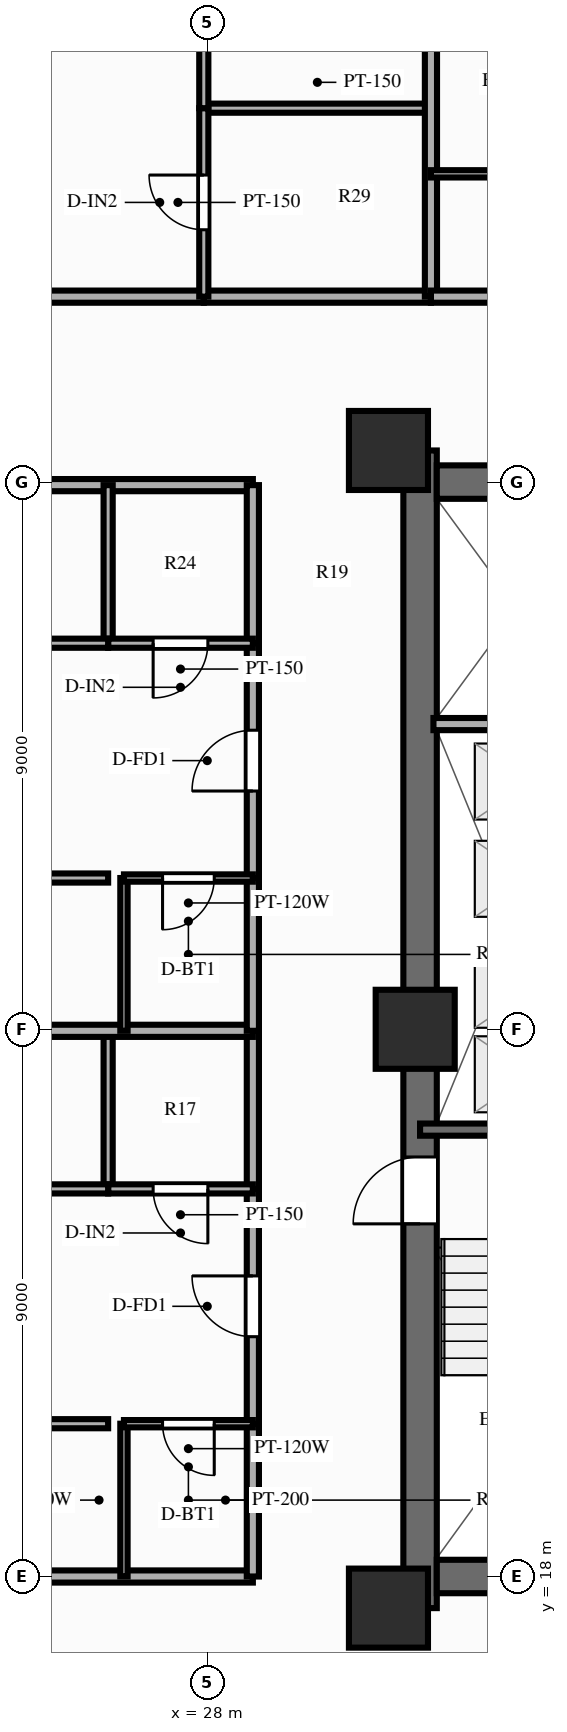
"""IFC4 building model, lengths in metres.
Left out: names, types, materials, properties, quantities, classifications, styles, units other than length and angle.
Written with IfcOpenShell. Run it as: python <this file> out.ifc"""

import sys

from ifc_helpers import new_model, si_unit, direction, frame, frame_2d, origin, origin_2d, place, context, subcontext, project, spatial, rectangle, extrude, source, transform, mapped, element, fill, save


model = new_model("IFC4")
c1 = context("Model", 3, precision=1e-05, world=origin(), true_north=direction((0.0, 1.0)))
c2 = subcontext(c1, "Body", "Model", "MODEL_VIEW")
j1 = project(units=[si_unit("LENGTHUNIT", "METRE"), si_unit("PLANEANGLEUNIT", "RADIAN")], contexts=[c1])
p1 = place(None, origin())
s1 = spatial("IfcSite", under=j1, at=p1, CompositionType="ELEMENT")
p2 = place(p1, origin())
s2 = spatial("IfcBuilding", under=s1, at=p2, CompositionType="ELEMENT")
p3 = place(p2, frame((0.0, 0.0, 83.85)))
s3 = spatial("IfcBuildingStorey", under=s2, at=p3, CompositionType="ELEMENT", Elevation=83.85)
p4 = place(p3, frame((31.5, 17.48, 0.0), z_axis=(0.0, 0.0, 1.0), x_axis=(0.0, 1.0, 0.0)))
e1 = element("IfcWall", 1, at=p4, inside=s3, PredefinedType="SHEAR", context=c2, shape_type="SweptSolid", body=[
    extrude(rectangle(XDim=19.04, YDim=0.55, at=frame_2d((9.52, 0.0))), origin(), (0.0, 0.0, 1.0), 3.0),
])
p5 = place(p4, frame((6.32, 0.0, 0.0)))
e2 = element("IfcOpeningElement", 2, at=p5, cuts=e1, PredefinedType="OPENING", context=c2, shape_type="SweptSolid", body=[
    extrude(rectangle(XDim=1.1, YDim=2.15, at=frame_2d((0.55, 1.075))), frame((0.0, 0.287, 0.0), z_axis=(0.0, -1.0, 0.0), x_axis=(1.0, 0.0, 0.0)), (0.0, 0.0, 1.0), 0.574),
])
p6 = place(p3, frame((31.775, 18.0, 0.0), z_axis=(0.0, 0.0, 1.0), x_axis=(1.0, 0.0, 0.0)))
e3 = element("IfcWall", 3, at=p6, inside=s3, PredefinedType="SHEAR", context=c2, shape_type="SweptSolid", body=[
    extrude(rectangle(XDim=12.45, YDim=0.55, at=frame_2d((6.225, 0.0))), origin(), (0.0, 0.0, 1.0), 3.0),
])
p7 = place(p3, frame((31.775, 36.0, 0.0), z_axis=(0.0, 0.0, 1.0), x_axis=(1.0, 0.0, 0.0)))
e4 = element("IfcWall", 4, at=p7, inside=s3, PredefinedType="SHEAR", context=c2, shape_type="SweptSolid", body=[
    extrude(rectangle(XDim=12.45, YDim=0.55, at=frame_2d((6.225, 0.0))), origin(), (0.0, 0.0, 1.0), 3.0),
])
p8 = place(p7, frame((5.175, 0.0, 0.0), z_axis=(0.0, 0.0, 1.0), x_axis=(-1.0, 0.0, 0.0)))
e5 = element("IfcOpeningElement", 5, at=p8, cuts=e4, PredefinedType="OPENING", context=c2, shape_type="SweptSolid", body=[
    extrude(rectangle(XDim=1.4, YDim=2.15, at=frame_2d((0.7, 1.075))), frame((0.0, 0.287, 0.0), z_axis=(0.0, -1.0, 0.0), x_axis=(1.0, 0.0, 0.0)), (0.0, 0.0, 1.0), 0.574),
])
m1 = source(origin(), c2, "Body", "SweptSolid", [
    extrude(rectangle(XDim=1.3, YDim=1.3, at=origin_2d()), origin(), (0.0, 0.0, 1.0), 3.0),
])
for number, where, z_axis, x_axis in (
    (6, (30.98, 17.48, 0.0), (0.0, 0.0, 1.0), (1.0, 0.0, 0.0)),
    (7, (30.98, 36.52, 0.0), (0.0, 0.0, 1.0), (1.0, 0.0, 0.0)),
    (8, (31.42, 27.0, 0.0), (0.0, 0.0, 1.0), (1.0, 0.0, 0.0)),
):
    element("IfcColumn", number, at=place(p3, frame(where, z_axis=z_axis, x_axis=x_axis)), inside=s3, PredefinedType="COLUMN", context=c2, shape_type="MappedRepresentation", body=[
        mapped(m1, transform((0.0, 0.0, 0.0), scale=1.0)),
    ])
p9 = place(p3, frame((31.5, 25.35, 0.0), z_axis=(0.0, 0.0, 1.0), x_axis=(1.0, 0.0, 0.0)))
e9 = element("IfcWall", 9, at=p9, inside=s3, PredefinedType="SOLIDWALL", context=c2, shape_type="SweptSolid", body=[
    extrude(rectangle(XDim=3.93, YDim=0.2, at=frame_2d((1.965, 0.0))), origin(), (0.0, 0.0, 1.0), 2.79),
])
p10 = place(p3, frame((31.72, 32.02, 0.0), z_axis=(0.0, 0.0, 1.0), x_axis=(1.0, 0.0, 0.0)))
e10 = element("IfcWall", 10, at=p10, inside=s3, PredefinedType="PARTITIONING", context=c2, shape_type="SweptSolid", body=[
    extrude(rectangle(XDim=2.8, YDim=0.2, at=frame_2d((1.4, 0.0))), origin(), (0.0, 0.0, 1.0), 2.79),
])
p11 = place(p3, frame((21.28, 39.05, 0.0), z_axis=(0.0, 0.0, 1.0), x_axis=(1.0, 0.0, 0.0)))
e11 = element("IfcWall", 11, at=p11, inside=s3, PredefinedType="PARTITIONING", context=c2, shape_type="SweptSolid", body=[
    extrude(rectangle(XDim=6.663, YDim=0.2, at=frame_2d((3.332, 0.0))), origin(), (0.0, 0.0, 1.0), 2.79),
])
p12 = place(p11, frame((2.832, 0.0, 0.0)))
e12 = element("IfcOpeningElement", 12, at=p12, cuts=e11, PredefinedType="OPENING", context=c2, shape_type="SweptSolid", body=[
    extrude(rectangle(XDim=1.0, YDim=2.15, at=frame_2d((0.5, 1.075))), frame((0.0, 0.112, 0.0), z_axis=(0.0, -1.0, 0.0), x_axis=(1.0, 0.0, 0.0)), (0.0, 0.0, 1.0), 0.224),
])
p13 = place(p3, frame((27.943, 39.05, 0.0), z_axis=(0.0, 0.0, 1.0), x_axis=(1.0, 0.0, 0.0)))
e13 = element("IfcWall", 13, at=p13, inside=s3, PredefinedType="PARTITIONING", context=c2, shape_type="SweptSolid", body=[
    extrude(rectangle(XDim=3.736, YDim=0.2, at=frame_2d((1.868, 0.0))), origin(), (0.0, 0.0, 1.0), 2.79),
])
p14 = place(p3, frame((27.943, 42.15, 0.0), z_axis=(0.0, 0.0, 1.0), x_axis=(1.0, 0.0, 0.0)))
e14 = element("IfcWall", 14, at=p14, inside=s3, PredefinedType="PARTITIONING", context=c2, shape_type="SweptSolid", body=[
    extrude(rectangle(XDim=3.736, YDim=0.15, at=frame_2d((1.868, 0.0))), origin(), (0.0, 0.0, 1.0), 2.79),
])
p15 = place(p3, frame((27.943, 39.05, 0.0), z_axis=(0.0, 0.0, 1.0), x_axis=(0.0, 1.0, 0.0)))
e15 = element("IfcWall", 15, at=p15, inside=s3, PredefinedType="PARTITIONING", context=c2, shape_type="SweptSolid", body=[
    extrude(rectangle(XDim=3.1, YDim=0.15, at=frame_2d((1.55, 0.0))), origin(), (0.0, 0.0, 1.0), 2.79),
])
p16 = place(p15, frame((1.1, 0.0, 0.0)))
e16 = element("IfcOpeningElement", 16, at=p16, cuts=e15, PredefinedType="OPENING", context=c2, shape_type="SweptSolid", body=[
    extrude(rectangle(XDim=0.9, YDim=2.1, at=frame_2d((0.45, 1.05))), frame((0.0, 0.087, 0.0), z_axis=(0.0, -1.0, 0.0), x_axis=(1.0, 0.0, 0.0)), (0.0, 0.0, 1.0), 0.174),
])
p17 = place(p3, frame((27.943, 42.15, 0.0), z_axis=(0.0, 0.0, 1.0), x_axis=(0.0, 1.0, 0.0)))
e17 = element("IfcWall", 17, at=p17, inside=s3, PredefinedType="PARTITIONING", context=c2, shape_type="SweptSolid", body=[
    extrude(rectangle(XDim=8.7, YDim=0.15, at=frame_2d((4.35, 0.0))), origin(), (0.0, 0.0, 1.0), 2.79),
])
p18 = place(p17, frame((3.595, 0.0, 0.0)))
e18 = element("IfcOpeningElement", 18, at=p18, cuts=e17, PredefinedType="OPENING", context=c2, shape_type="SweptSolid", body=[
    extrude(rectangle(XDim=0.9, YDim=2.1, at=frame_2d((0.45, 1.05))), frame((0.0, 0.087, 0.0), z_axis=(0.0, -1.0, 0.0), x_axis=(1.0, 0.0, 0.0)), (0.0, 0.0, 1.0), 0.174),
])
p19 = place(p3, frame((31.679, 39.05, 0.0), z_axis=(0.0, 0.0, 1.0), x_axis=(0.0, 1.0, 0.0)))
e19 = element("IfcWall", 19, at=p19, inside=s3, PredefinedType="PARTITIONING", context=c2, shape_type="SweptSolid", body=[
    extrude(rectangle(XDim=11.8, YDim=0.2, at=frame_2d((5.9, 0.0))), origin(), (0.0, 0.0, 1.0), 2.79),
])
p20 = place(p3, frame((31.679, 39.05, 0.0), z_axis=(0.0, 0.0, 1.0), x_axis=(1.0, 0.0, 0.0)))
e20 = element("IfcWall", 20, at=p20, inside=s3, PredefinedType="PARTITIONING", context=c2, shape_type="SweptSolid", body=[
    extrude(rectangle(XDim=3.526, YDim=0.2, at=frame_2d((1.763, 0.0))), origin(), (0.0, 0.0, 1.0), 2.79),
])
p21 = place(p3, frame((31.679, 41.07, 0.0), z_axis=(0.0, 0.0, 1.0), x_axis=(1.0, 0.0, 0.0)))
e21 = element("IfcWall", 21, at=p21, inside=s3, PredefinedType="PARTITIONING", context=c2, shape_type="SweptSolid", body=[
    extrude(rectangle(XDim=3.526, YDim=0.12, at=frame_2d((1.763, 0.0))), origin(), (0.0, 0.0, 1.0), 2.79),
])
for number, where, z_axis, x_axis in (
    (22, (28.75, 18.0, 0.0), (0.0, 0.0, 1.0), (-1.0, 0.0, 0.0)),
    (23, (28.75, 35.95, 0.0), (0.0, 0.0, 1.0), (-1.0, 0.0, 0.0)),
):
    element("IfcWall", number, at=place(p3, frame(where, z_axis=z_axis, x_axis=x_axis)), inside=s3, PredefinedType="PARTITIONING", context=c2, shape_type="SweptSolid", body=[
        extrude(rectangle(XDim=16.6, YDim=0.2, at=frame_2d((8.3, 0.0))), origin(), (0.0, 0.0, 1.0), 2.34),
    ])
p22 = place(p3, frame((28.75, 18.0, 0.0), z_axis=(0.0, 0.0, 1.0), x_axis=(0.0, 1.0, 0.0)))
e24 = element("IfcWall", 24, at=p22, inside=s3, PredefinedType="PARTITIONING", context=c2, shape_type="SweptSolid", body=[
    extrude(rectangle(XDim=2.513, YDim=0.2, at=frame_2d((1.256, 0.0))), origin(), (0.0, 0.0, 1.0), 2.79),
])
p23 = place(p3, frame((28.75, 20.513, 0.0), z_axis=(0.0, 0.0, 1.0), x_axis=(0.0, 1.0, 0.0)))
e25 = element("IfcWall", 25, at=p23, inside=s3, PredefinedType="PARTITIONING", context=c2, shape_type="SweptSolid", body=[
    extrude(rectangle(XDim=3.862, YDim=0.2, at=frame_2d((1.931, 0.0))), origin(), (0.0, 0.0, 1.0), 2.79),
])
p24 = place(p23, frame((1.431, 0.0, 0.0)))
e26 = element("IfcOpeningElement", 26, at=p24, cuts=e25, PredefinedType="OPENING", context=c2, shape_type="SweptSolid", body=[
    extrude(rectangle(XDim=1.0, YDim=2.15, at=frame_2d((0.5, 1.075))), frame((0.0, 0.112, 0.0), z_axis=(0.0, -1.0, 0.0), x_axis=(1.0, 0.0, 0.0)), (0.0, 0.0, 1.0), 0.224),
])
p25 = place(p3, frame((28.75, 24.375, 0.0), z_axis=(0.0, 0.0, 1.0), x_axis=(0.0, 1.0, 0.0)))
e27 = element("IfcWall", 27, at=p25, inside=s3, PredefinedType="PARTITIONING", context=c2, shape_type="SweptSolid", body=[
    extrude(rectangle(XDim=2.6, YDim=0.2, at=frame_2d((1.3, 0.0))), origin(), (0.0, 0.0, 1.0), 2.79),
])
p26 = place(p3, frame((26.63, 18.0, 0.0), z_axis=(0.0, 0.0, 1.0), x_axis=(0.0, 1.0, 0.0)))
e28 = element("IfcWall", 28, at=p26, inside=s3, PredefinedType="PARTITIONING", context=c2, shape_type="SweptSolid", body=[
    extrude(rectangle(XDim=2.513, YDim=0.12, at=frame_2d((1.256, 0.0))), origin(), (0.0, 0.0, 1.0), 2.79),
])
p27 = place(p3, frame((26.37, 24.375, 0.0), z_axis=(0.0, 0.0, 1.0), x_axis=(0.0, 1.0, 0.0)))
e29 = element("IfcWall", 29, at=p27, inside=s3, PredefinedType="PARTITIONING", context=c2, shape_type="SweptSolid", body=[
    extrude(rectangle(XDim=2.6, YDim=0.15, at=frame_2d((1.3, 0.0))), origin(), (0.0, 0.0, 1.0), 2.79),
])
p28 = place(p3, frame((28.75, 20.513, 0.0), z_axis=(0.0, 0.0, 1.0), x_axis=(-1.0, 0.0, 0.0)))
e30 = element("IfcWall", 30, at=p28, inside=s3, PredefinedType="PARTITIONING", context=c2, shape_type="SweptSolid", body=[
    extrude(rectangle(XDim=2.12, YDim=0.12, at=frame_2d((1.06, 0.0))), origin(), (0.0, 0.0, 1.0), 2.79),
])
p29 = place(p28, frame((0.635, 0.0, 0.0)))
e31 = element("IfcOpeningElement", 31, at=p29, cuts=e30, PredefinedType="OPENING", context=c2, shape_type="SweptSolid", body=[
    extrude(rectangle(XDim=0.85, YDim=2.05, at=frame_2d((0.425, 1.025))), frame((0.0, 0.072, 0.0), z_axis=(0.0, -1.0, 0.0), x_axis=(1.0, 0.0, 0.0)), (0.0, 0.0, 1.0), 0.144),
])
p30 = place(p3, frame((26.37, 20.513, 0.0), z_axis=(0.0, 0.0, 1.0), x_axis=(-1.0, 0.0, 0.0)))
e32 = element("IfcWall", 32, at=p30, inside=s3, PredefinedType="PARTITIONING", context=c2, shape_type="SweptSolid", body=[
    extrude(rectangle(XDim=14.22, YDim=0.15, at=frame_2d((7.11, 0.0))), origin(), (0.0, 0.0, 1.0), 2.79),
])
p31 = place(p30, frame((6.125, 0.0, 0.0)))
e33 = element("IfcOpeningElement", 33, at=p31, cuts=e32, PredefinedType="OPENING", context=c2, shape_type="SweptSolid", body=[
    extrude(rectangle(XDim=0.9, YDim=2.1, at=frame_2d((0.45, 1.05))), frame((0.0, 0.087, 0.0), z_axis=(0.0, -1.0, 0.0), x_axis=(1.0, 0.0, 0.0)), (0.0, 0.0, 1.0), 0.174),
])
p32 = place(p3, frame((28.75, 24.375, 0.0), z_axis=(0.0, 0.0, 1.0), x_axis=(-1.0, 0.0, 0.0)))
e34 = element("IfcWall", 34, at=p32, inside=s3, PredefinedType="PARTITIONING", context=c2, shape_type="SweptSolid", body=[
    extrude(rectangle(XDim=2.38, YDim=0.15, at=frame_2d((1.19, 0.0))), origin(), (0.0, 0.0, 1.0), 2.79),
])
p33 = place(p32, frame((0.74, 0.0, 0.0)))
e35 = element("IfcOpeningElement", 35, at=p33, cuts=e34, PredefinedType="OPENING", context=c2, shape_type="SweptSolid", body=[
    extrude(rectangle(XDim=0.9, YDim=2.1, at=frame_2d((0.45, 1.05))), frame((0.0, 0.087, 0.0), z_axis=(0.0, -1.0, 0.0), x_axis=(1.0, 0.0, 0.0)), (0.0, 0.0, 1.0), 0.174),
])
p34 = place(p3, frame((26.37, 24.375, 0.0), z_axis=(0.0, 0.0, 1.0), x_axis=(-1.0, 0.0, 0.0)))
e36 = element("IfcWall", 36, at=p34, inside=s3, PredefinedType="PARTITIONING", context=c2, shape_type="SweptSolid", body=[
    extrude(rectangle(XDim=14.22, YDim=0.15, at=frame_2d((7.11, 0.0))), origin(), (0.0, 0.0, 1.0), 2.79),
])
p35 = place(p34, frame((6.125, 0.0, 0.0)))
e37 = element("IfcOpeningElement", 37, at=p35, cuts=e36, PredefinedType="OPENING", context=c2, shape_type="SweptSolid", body=[
    extrude(rectangle(XDim=0.9, YDim=2.1, at=frame_2d((0.45, 1.05))), frame((0.0, 0.087, 0.0), z_axis=(0.0, -1.0, 0.0), x_axis=(1.0, 0.0, 0.0)), (0.0, 0.0, 1.0), 0.174),
])
p36 = place(p3, frame((28.75, 26.975, 0.0), z_axis=(0.0, 0.0, 1.0), x_axis=(-1.0, 0.0, 0.0)))
e38 = element("IfcWall", 38, at=p36, inside=s3, PredefinedType="PARTITIONING", context=c2, shape_type="SweptSolid", body=[
    extrude(rectangle(XDim=16.6, YDim=0.2, at=frame_2d((8.3, 0.0))), origin(), (0.0, 0.0, 1.0), 2.79),
])
p37 = place(p3, frame((28.75, 26.975, 0.0), z_axis=(0.0, 0.0, 1.0), x_axis=(0.0, 1.0, 0.0)))
e39 = element("IfcWall", 39, at=p37, inside=s3, PredefinedType="PARTITIONING", context=c2, shape_type="SweptSolid", body=[
    extrude(rectangle(XDim=2.513, YDim=0.2, at=frame_2d((1.256, 0.0))), origin(), (0.0, 0.0, 1.0), 2.79),
])
p38 = place(p3, frame((28.75, 29.488, 0.0), z_axis=(0.0, 0.0, 1.0), x_axis=(0.0, 1.0, 0.0)))
e40 = element("IfcWall", 40, at=p38, inside=s3, PredefinedType="PARTITIONING", context=c2, shape_type="SweptSolid", body=[
    extrude(rectangle(XDim=3.862, YDim=0.2, at=frame_2d((1.931, 0.0))), origin(), (0.0, 0.0, 1.0), 2.79),
])
p39 = place(p38, frame((1.431, 0.0, 0.0)))
e41 = element("IfcOpeningElement", 41, at=p39, cuts=e40, PredefinedType="OPENING", context=c2, shape_type="SweptSolid", body=[
    extrude(rectangle(XDim=1.0, YDim=2.15, at=frame_2d((0.5, 1.075))), frame((0.0, 0.112, 0.0), z_axis=(0.0, -1.0, 0.0), x_axis=(1.0, 0.0, 0.0)), (0.0, 0.0, 1.0), 0.224),
])
p40 = place(p3, frame((28.75, 33.35, 0.0), z_axis=(0.0, 0.0, 1.0), x_axis=(0.0, 1.0, 0.0)))
e42 = element("IfcWall", 42, at=p40, inside=s3, PredefinedType="PARTITIONING", context=c2, shape_type="SweptSolid", body=[
    extrude(rectangle(XDim=2.6, YDim=0.2, at=frame_2d((1.3, 0.0))), origin(), (0.0, 0.0, 1.0), 2.79),
])
p41 = place(p3, frame((26.63, 26.975, 0.0), z_axis=(0.0, 0.0, 1.0), x_axis=(0.0, 1.0, 0.0)))
e43 = element("IfcWall", 43, at=p41, inside=s3, PredefinedType="PARTITIONING", context=c2, shape_type="SweptSolid", body=[
    extrude(rectangle(XDim=2.513, YDim=0.12, at=frame_2d((1.256, 0.0))), origin(), (0.0, 0.0, 1.0), 2.79),
])
p42 = place(p3, frame((26.37, 33.35, 0.0), z_axis=(0.0, 0.0, 1.0), x_axis=(0.0, 1.0, 0.0)))
e44 = element("IfcWall", 44, at=p42, inside=s3, PredefinedType="PARTITIONING", context=c2, shape_type="SweptSolid", body=[
    extrude(rectangle(XDim=2.6, YDim=0.15, at=frame_2d((1.3, 0.0))), origin(), (0.0, 0.0, 1.0), 2.79),
])
p43 = place(p3, frame((28.75, 29.488, 0.0), z_axis=(0.0, 0.0, 1.0), x_axis=(-1.0, 0.0, 0.0)))
e45 = element("IfcWall", 45, at=p43, inside=s3, PredefinedType="PARTITIONING", context=c2, shape_type="SweptSolid", body=[
    extrude(rectangle(XDim=2.12, YDim=0.12, at=frame_2d((1.06, 0.0))), origin(), (0.0, 0.0, 1.0), 2.79),
])
p44 = place(p43, frame((0.635, 0.0, 0.0)))
e46 = element("IfcOpeningElement", 46, at=p44, cuts=e45, PredefinedType="OPENING", context=c2, shape_type="SweptSolid", body=[
    extrude(rectangle(XDim=0.85, YDim=2.05, at=frame_2d((0.425, 1.025))), frame((0.0, 0.072, 0.0), z_axis=(0.0, -1.0, 0.0), x_axis=(1.0, 0.0, 0.0)), (0.0, 0.0, 1.0), 0.144),
])
p45 = place(p3, frame((26.37, 29.488, 0.0), z_axis=(0.0, 0.0, 1.0), x_axis=(-1.0, 0.0, 0.0)))
e47 = element("IfcWall", 47, at=p45, inside=s3, PredefinedType="PARTITIONING", context=c2, shape_type="SweptSolid", body=[
    extrude(rectangle(XDim=14.22, YDim=0.15, at=frame_2d((7.11, 0.0))), origin(), (0.0, 0.0, 1.0), 2.79),
])
p46 = place(p45, frame((6.125, 0.0, 0.0)))
e48 = element("IfcOpeningElement", 48, at=p46, cuts=e47, PredefinedType="OPENING", context=c2, shape_type="SweptSolid", body=[
    extrude(rectangle(XDim=0.9, YDim=2.1, at=frame_2d((0.45, 1.05))), frame((0.0, 0.087, 0.0), z_axis=(0.0, -1.0, 0.0), x_axis=(1.0, 0.0, 0.0)), (0.0, 0.0, 1.0), 0.174),
])
p47 = place(p3, frame((28.75, 33.35, 0.0), z_axis=(0.0, 0.0, 1.0), x_axis=(-1.0, 0.0, 0.0)))
e49 = element("IfcWall", 49, at=p47, inside=s3, PredefinedType="PARTITIONING", context=c2, shape_type="SweptSolid", body=[
    extrude(rectangle(XDim=2.38, YDim=0.15, at=frame_2d((1.19, 0.0))), origin(), (0.0, 0.0, 1.0), 2.79),
])
p48 = place(p47, frame((0.74, 0.0, 0.0)))
e50 = element("IfcOpeningElement", 50, at=p48, cuts=e49, PredefinedType="OPENING", context=c2, shape_type="SweptSolid", body=[
    extrude(rectangle(XDim=0.9, YDim=2.1, at=frame_2d((0.45, 1.05))), frame((0.0, 0.087, 0.0), z_axis=(0.0, -1.0, 0.0), x_axis=(1.0, 0.0, 0.0)), (0.0, 0.0, 1.0), 0.174),
])
p49 = place(p3, frame((26.37, 33.35, 0.0), z_axis=(0.0, 0.0, 1.0), x_axis=(-1.0, 0.0, 0.0)))
e51 = element("IfcWall", 51, at=p49, inside=s3, PredefinedType="PARTITIONING", context=c2, shape_type="SweptSolid", body=[
    extrude(rectangle(XDim=14.22, YDim=0.15, at=frame_2d((7.11, 0.0))), origin(), (0.0, 0.0, 1.0), 2.79),
])
p50 = place(p49, frame((6.125, 0.0, 0.0)))
e52 = element("IfcOpeningElement", 52, at=p50, cuts=e51, PredefinedType="OPENING", context=c2, shape_type="SweptSolid", body=[
    extrude(rectangle(XDim=0.9, YDim=2.1, at=frame_2d((0.45, 1.05))), frame((0.0, 0.087, 0.0), z_axis=(0.0, -1.0, 0.0), x_axis=(1.0, 0.0, 0.0)), (0.0, 0.0, 1.0), 0.174),
])
m2 = source(origin(), c2, "Body", "SweptSolid", [
    extrude(rectangle(XDim=1.1, YDim=2.15, at=frame_2d((0.55, 1.075))), frame((0.0, 0.025, 0.0), z_axis=(0.0, -1.0, 0.0), x_axis=(1.0, 0.0, 0.0)), (0.0, 0.0, 1.0), 0.05),
])
p51 = place(p5, origin())
e53 = element("IfcDoor", 53, at=p51, inside=s3, OperationType="SINGLE_SWING_LEFT", PredefinedType="DOOR", context=c2, shape_type="MappedRepresentation", body=[
    mapped(m2, transform((0.0, 0.0, 0.0), scale=1.0)),
])
fill(e2, e53)
m3 = source(origin(), c2, "Body", "SweptSolid", [
    extrude(rectangle(XDim=0.9, YDim=2.1, at=frame_2d((0.45, 1.05))), frame((0.0, 0.025, 0.0), z_axis=(0.0, -1.0, 0.0), x_axis=(1.0, 0.0, 0.0)), (0.0, 0.0, 1.0), 0.05),
])
p52 = place(p16, origin())
e54 = element("IfcDoor", 54, at=p52, inside=s3, OperationType="SINGLE_SWING_RIGHT", PredefinedType="DOOR", context=c2, shape_type="MappedRepresentation", body=[
    mapped(m3, transform((0.0, 0.0, 0.0), scale=1.0)),
])
fill(e16, e54)
m4 = source(origin(), c2, "Body", "SweptSolid", [
    extrude(rectangle(XDim=1.0, YDim=2.15, at=frame_2d((0.5, 1.075))), frame((0.0, 0.025, 0.0), z_axis=(0.0, -1.0, 0.0), x_axis=(1.0, 0.0, 0.0)), (0.0, 0.0, 1.0), 0.05),
])
p53 = place(p24, origin())
e55 = element("IfcDoor", 55, at=p53, inside=s3, OperationType="SINGLE_SWING_RIGHT", PredefinedType="DOOR", context=c2, shape_type="MappedRepresentation", body=[
    mapped(m4, transform((0.0, 0.0, 0.0), scale=1.0)),
])
fill(e26, e55)
m5 = source(origin(), c2, "Body", "SweptSolid", [
    extrude(rectangle(XDim=0.85, YDim=2.05, at=frame_2d((0.425, 1.025))), frame((0.0, 0.025, 0.0), z_axis=(0.0, -1.0, 0.0), x_axis=(1.0, 0.0, 0.0)), (0.0, 0.0, 1.0), 0.05),
])
p54 = place(p29, origin())
e56 = element("IfcDoor", 56, at=p54, inside=s3, OperationType="SINGLE_SWING_LEFT", PredefinedType="DOOR", context=c2, shape_type="MappedRepresentation", body=[
    mapped(m5, transform((0.0, 0.0, 0.0), scale=1.0)),
])
fill(e31, e56)
p55 = place(p33, origin())
e57 = element("IfcDoor", 57, at=p55, inside=s3, OperationType="SINGLE_SWING_LEFT", PredefinedType="DOOR", context=c2, shape_type="MappedRepresentation", body=[
    mapped(m3, transform((0.0, 0.0, 0.0), scale=1.0)),
])
fill(e35, e57)
p56 = place(p39, origin())
e58 = element("IfcDoor", 58, at=p56, inside=s3, OperationType="SINGLE_SWING_LEFT", PredefinedType="DOOR", context=c2, shape_type="MappedRepresentation", body=[
    mapped(m4, transform((0.0, 0.0, 0.0), scale=1.0)),
])
fill(e41, e58)
p57 = place(p44, origin())
e59 = element("IfcDoor", 59, at=p57, inside=s3, OperationType="SINGLE_SWING_RIGHT", PredefinedType="DOOR", context=c2, shape_type="MappedRepresentation", body=[
    mapped(m5, transform((0.0, 0.0, 0.0), scale=1.0)),
])
fill(e46, e59)
p58 = place(p48, origin())
e60 = element("IfcDoor", 60, at=p58, inside=s3, OperationType="SINGLE_SWING_RIGHT", PredefinedType="DOOR", context=c2, shape_type="MappedRepresentation", body=[
    mapped(m3, transform((0.0, 0.0, 0.0), scale=1.0)),
])
fill(e50, e60)
save(model, sys.argv[1])
